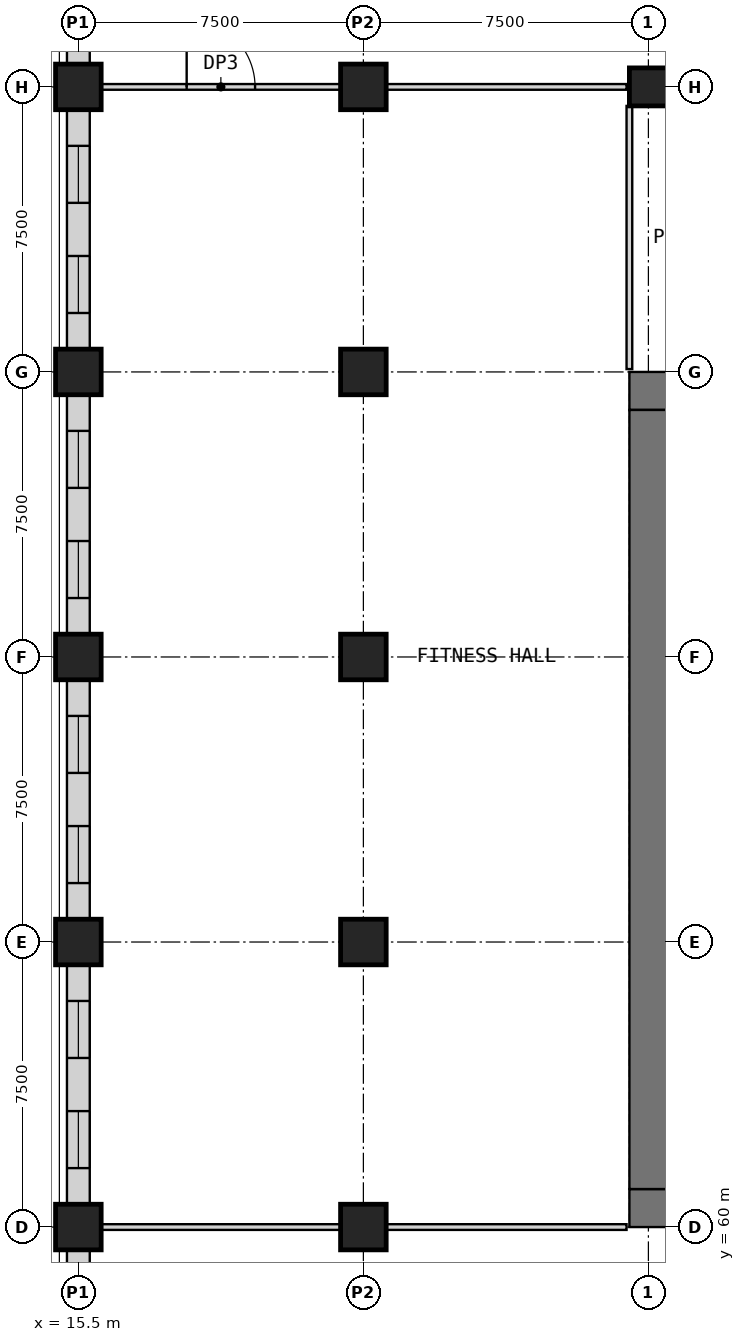
"""IFC4 building model, lengths in metres.
Left out: names, types, materials, properties, quantities, classifications, styles, units other than length and angle.
Written with IfcOpenShell. Run it as: python <this file> out.ifc"""

import sys

from ifc_helpers import new_model, si_unit, direction, frame, frame_2d, origin, origin_2d, place, context, subcontext, project, spatial, rectangle, extrude, element, fill, save


model = new_model("IFC4")
c1 = context("Model", 3, precision=1e-05, world=origin(), true_north=direction((0.0, 1.0)))
c2 = subcontext(c1, "Body", "Model", "MODEL_VIEW")
j1 = project(units=[si_unit("LENGTHUNIT", "METRE"), si_unit("PLANEANGLEUNIT", "RADIAN")], contexts=[c1])
p1 = place(None, origin())
s1 = spatial("IfcSite", under=j1, at=p1, CompositionType="ELEMENT")
p2 = place(p1, origin())
s2 = spatial("IfcBuilding", under=s1, at=p2, CompositionType="ELEMENT")
p3 = place(p2, frame((0.0, 0.0, 29.0)))
s3 = spatial("IfcBuildingStorey", under=s2, at=p3, CompositionType="ELEMENT", Elevation=29.0)
p4 = place(p3, frame((30.5, 90.0, 0.0), z_axis=(0.0, 0.0, 1.0), x_axis=(1.0, 0.0, 0.0)))
e1 = element("IfcColumn", 1, at=p4, inside=s3, PredefinedType="COLUMN", context=c2, shape_type="SweptSolid", body=[
    extrude(rectangle(XDim=1.0, YDim=1.0, at=origin_2d()), origin(), (0.0, 0.0, 1.0), 5.0),
])
for number, where, z_axis, x_axis in (
    (2, (15.5, 60.0, 0.0), (0.0, 0.0, 1.0), (1.0, 0.0, 0.0)),
    (3, (15.5, 67.5, 0.0), (0.0, 0.0, 1.0), (1.0, 0.0, 0.0)),
    (4, (15.5, 75.0, 0.0), (0.0, 0.0, 1.0), (1.0, 0.0, 0.0)),
    (5, (15.5, 82.5, 0.0), (0.0, 0.0, 1.0), (1.0, 0.0, 0.0)),
    (6, (15.5, 90.0, 0.0), (0.0, 0.0, 1.0), (1.0, 0.0, 0.0)),
    (7, (23.0, 60.0, 0.0), (0.0, 0.0, 1.0), (1.0, 0.0, 0.0)),
    (8, (23.0, 67.5, 0.0), (0.0, 0.0, 1.0), (1.0, 0.0, 0.0)),
    (9, (23.0, 75.0, 0.0), (0.0, 0.0, 1.0), (1.0, 0.0, 0.0)),
    (10, (23.0, 82.5, 0.0), (0.0, 0.0, 1.0), (1.0, 0.0, 0.0)),
    (11, (23.0, 90.0, 0.0), (0.0, 0.0, 1.0), (1.0, 0.0, 0.0)),
):
    element("IfcColumn", number, at=place(p3, frame(where, z_axis=z_axis, x_axis=x_axis)), inside=s3, PredefinedType="COLUMN", context=c2, shape_type="SweptSolid", body=[
        extrude(rectangle(XDim=1.2, YDim=1.2, at=origin_2d()), origin(), (0.0, 0.0, 1.0), 5.0),
    ])
p5 = place(p3, frame((30.0, 60.5, 0.0), z_axis=(0.0, 0.0, 1.0), x_axis=(1.0, 0.0, 0.0)))
e12 = element("IfcWall", 12, at=p5, inside=s3, PredefinedType="SHEAR", context=c2, shape_type="SweptSolid", body=[
    extrude(rectangle(XDim=30.0, YDim=1.0, at=frame_2d((15.0, 0.0))), origin(), (0.0, 0.0, 1.0), 5.0),
])
p6 = place(p5, frame((21.9, 0.0, 0.0)))
e13 = element("IfcOpeningElement", 13, at=p6, cuts=e12, PredefinedType="OPENING", context=c2, shape_type="SweptSolid", body=[
    extrude(rectangle(XDim=1.8, YDim=2.1, at=frame_2d((0.9, 1.05))), frame((0.0, 0.51, 0.0), z_axis=(0.0, -1.0, 0.0), x_axis=(1.0, 0.0, 0.0)), (0.0, 0.0, 1.0), 1.02),
])
p7 = place(p5, frame((26.5, 0.0, 0.0)))
e14 = element("IfcOpeningElement", 14, at=p7, cuts=e12, PredefinedType="OPENING", context=c2, shape_type="SweptSolid", body=[
    extrude(rectangle(XDim=1.2, YDim=2.1, at=frame_2d((0.6, 1.05))), frame((0.0, 0.51, 0.0), z_axis=(0.0, -1.0, 0.0), x_axis=(1.0, 0.0, 0.0)), (0.0, 0.0, 1.0), 1.02),
])
p8 = place(p3, frame((30.0, 82.0, 0.0), z_axis=(0.0, 0.0, 1.0), x_axis=(1.0, 0.0, 0.0)))
e15 = element("IfcWall", 15, at=p8, inside=s3, PredefinedType="SHEAR", context=c2, shape_type="SweptSolid", body=[
    extrude(rectangle(XDim=30.0, YDim=1.0, at=frame_2d((15.0, 0.0))), origin(), (0.0, 0.0, 1.0), 5.0),
])
p9 = place(p3, frame((30.5, 61.0, 0.0), z_axis=(0.0, 0.0, 1.0), x_axis=(0.0, 1.0, 0.0)))
e16 = element("IfcWall", 16, at=p9, inside=s3, PredefinedType="SHEAR", context=c2, shape_type="SweptSolid", body=[
    extrude(rectangle(XDim=20.5, YDim=1.0, at=frame_2d((10.25, 0.0))), origin(), (0.0, 0.0, 1.0), 5.0),
])
p10 = place(p3, frame((16.1, 60.0, 0.0), z_axis=(0.0, 0.0, 1.0), x_axis=(1.0, 0.0, 0.0)))
e17 = element("IfcWall", 17, at=p10, inside=s3, PredefinedType="PARTITIONING", context=c2, shape_type="SweptSolid", body=[
    extrude(rectangle(XDim=6.3, YDim=0.15, at=frame_2d((3.15, 0.0))), origin(), (0.0, 0.0, 1.0), 4.7),
])
p11 = place(p3, frame((23.6, 60.0, 0.0), z_axis=(0.0, 0.0, 1.0), x_axis=(1.0, 0.0, 0.0)))
e18 = element("IfcWall", 18, at=p11, inside=s3, PredefinedType="PARTITIONING", context=c2, shape_type="SweptSolid", body=[
    extrude(rectangle(XDim=6.325, YDim=0.15, at=frame_2d((3.163, 0.0))), origin(), (0.0, 0.0, 1.0), 4.7),
])
p12 = place(p3, frame((16.1, 90.0, 0.0), z_axis=(0.0, 0.0, 1.0), x_axis=(1.0, 0.0, 0.0)))
e19 = element("IfcWall", 19, at=p12, inside=s3, PredefinedType="PARTITIONING", context=c2, shape_type="SweptSolid", body=[
    extrude(rectangle(XDim=6.3, YDim=0.15, at=frame_2d((3.15, 0.0))), origin(), (0.0, 0.0, 1.0), 4.7),
])
p13 = place(p12, frame((2.25, 0.0, 0.0)))
e20 = element("IfcOpeningElement", 20, at=p13, cuts=e19, PredefinedType="OPENING", context=c2, shape_type="SweptSolid", body=[
    extrude(rectangle(XDim=1.8, YDim=2.4, at=frame_2d((0.9, 1.2))), frame((0.0, 0.085, 0.0), z_axis=(0.0, -1.0, 0.0), x_axis=(1.0, 0.0, 0.0)), (0.0, 0.0, 1.0), 0.17),
])
p14 = place(p3, frame((23.6, 90.0, 0.0), z_axis=(0.0, 0.0, 1.0), x_axis=(1.0, 0.0, 0.0)))
e21 = element("IfcWall", 21, at=p14, inside=s3, PredefinedType="PARTITIONING", context=c2, shape_type="SweptSolid", body=[
    extrude(rectangle(XDim=6.325, YDim=0.15, at=frame_2d((3.163, 0.0))), origin(), (0.0, 0.0, 1.0), 4.7),
])
p15 = place(p3, frame((15.5, 53.1, 0.0), z_axis=(0.0, 0.0, 1.0), x_axis=(0.0, 1.0, 0.0)))
e22 = element("IfcWall", 22, at=p15, inside=s3, PredefinedType="PARTITIONING", context=c2, shape_type="SweptSolid", body=[
    extrude(rectangle(XDim=6.3, YDim=0.6, at=frame_2d((3.15, 0.0))), origin(), (0.0, 0.0, 1.0), 4.7),
])
p16 = place(p15, frame((0.951, 0.0, 0.9)))
e23 = element("IfcOpeningElement", 23, at=p16, cuts=e22, PredefinedType="OPENING", context=c2, shape_type="SweptSolid", body=[
    extrude(rectangle(XDim=1.5, YDim=2.8, at=frame_2d((0.75, 1.4))), frame((0.0, 0.31, 0.0), z_axis=(0.0, -1.0, 0.0), x_axis=(1.0, 0.0, 0.0)), (0.0, 0.0, 1.0), 0.62),
])
p17 = place(p15, frame((3.849, 0.0, 0.9)))
e24 = element("IfcOpeningElement", 24, at=p17, cuts=e22, PredefinedType="OPENING", context=c2, shape_type="SweptSolid", body=[
    extrude(rectangle(XDim=1.5, YDim=2.8, at=frame_2d((0.75, 1.4))), frame((0.0, 0.31, 0.0), z_axis=(0.0, -1.0, 0.0), x_axis=(1.0, 0.0, 0.0)), (0.0, 0.0, 1.0), 0.62),
])
p18 = place(p3, frame((15.5, 60.6, 0.0), z_axis=(0.0, 0.0, 1.0), x_axis=(0.0, 1.0, 0.0)))
e25 = element("IfcWall", 25, at=p18, inside=s3, PredefinedType="PARTITIONING", context=c2, shape_type="SweptSolid", body=[
    extrude(rectangle(XDim=6.3, YDim=0.6, at=frame_2d((3.15, 0.0))), origin(), (0.0, 0.0, 1.0), 4.7),
])
p19 = place(p18, frame((0.951, 0.0, 0.9)))
e26 = element("IfcOpeningElement", 26, at=p19, cuts=e25, PredefinedType="OPENING", context=c2, shape_type="SweptSolid", body=[
    extrude(rectangle(XDim=1.5, YDim=2.8, at=frame_2d((0.75, 1.4))), frame((0.0, 0.31, 0.0), z_axis=(0.0, -1.0, 0.0), x_axis=(1.0, 0.0, 0.0)), (0.0, 0.0, 1.0), 0.62),
])
p20 = place(p18, frame((3.849, 0.0, 0.9)))
e27 = element("IfcOpeningElement", 27, at=p20, cuts=e25, PredefinedType="OPENING", context=c2, shape_type="SweptSolid", body=[
    extrude(rectangle(XDim=1.5, YDim=2.8, at=frame_2d((0.75, 1.4))), frame((0.0, 0.31, 0.0), z_axis=(0.0, -1.0, 0.0), x_axis=(1.0, 0.0, 0.0)), (0.0, 0.0, 1.0), 0.62),
])
p21 = place(p3, frame((15.5, 68.1, 0.0), z_axis=(0.0, 0.0, 1.0), x_axis=(0.0, 1.0, 0.0)))
e28 = element("IfcWall", 28, at=p21, inside=s3, PredefinedType="PARTITIONING", context=c2, shape_type="SweptSolid", body=[
    extrude(rectangle(XDim=6.3, YDim=0.6, at=frame_2d((3.15, 0.0))), origin(), (0.0, 0.0, 1.0), 4.7),
])
p22 = place(p21, frame((0.951, 0.0, 0.9)))
e29 = element("IfcOpeningElement", 29, at=p22, cuts=e28, PredefinedType="OPENING", context=c2, shape_type="SweptSolid", body=[
    extrude(rectangle(XDim=1.5, YDim=2.8, at=frame_2d((0.75, 1.4))), frame((0.0, 0.31, 0.0), z_axis=(0.0, -1.0, 0.0), x_axis=(1.0, 0.0, 0.0)), (0.0, 0.0, 1.0), 0.62),
])
p23 = place(p21, frame((3.849, 0.0, 0.9)))
e30 = element("IfcOpeningElement", 30, at=p23, cuts=e28, PredefinedType="OPENING", context=c2, shape_type="SweptSolid", body=[
    extrude(rectangle(XDim=1.5, YDim=2.8, at=frame_2d((0.75, 1.4))), frame((0.0, 0.31, 0.0), z_axis=(0.0, -1.0, 0.0), x_axis=(1.0, 0.0, 0.0)), (0.0, 0.0, 1.0), 0.62),
])
p24 = place(p3, frame((15.5, 75.6, 0.0), z_axis=(0.0, 0.0, 1.0), x_axis=(0.0, 1.0, 0.0)))
e31 = element("IfcWall", 31, at=p24, inside=s3, PredefinedType="PARTITIONING", context=c2, shape_type="SweptSolid", body=[
    extrude(rectangle(XDim=6.3, YDim=0.6, at=frame_2d((3.15, 0.0))), origin(), (0.0, 0.0, 1.0), 4.7),
])
p25 = place(p24, frame((0.951, 0.0, 0.9)))
e32 = element("IfcOpeningElement", 32, at=p25, cuts=e31, PredefinedType="OPENING", context=c2, shape_type="SweptSolid", body=[
    extrude(rectangle(XDim=1.5, YDim=2.8, at=frame_2d((0.75, 1.4))), frame((0.0, 0.31, 0.0), z_axis=(0.0, -1.0, 0.0), x_axis=(1.0, 0.0, 0.0)), (0.0, 0.0, 1.0), 0.62),
])
p26 = place(p24, frame((3.849, 0.0, 0.9)))
e33 = element("IfcOpeningElement", 33, at=p26, cuts=e31, PredefinedType="OPENING", context=c2, shape_type="SweptSolid", body=[
    extrude(rectangle(XDim=1.5, YDim=2.8, at=frame_2d((0.75, 1.4))), frame((0.0, 0.31, 0.0), z_axis=(0.0, -1.0, 0.0), x_axis=(1.0, 0.0, 0.0)), (0.0, 0.0, 1.0), 0.62),
])
p27 = place(p3, frame((15.5, 83.1, 0.0), z_axis=(0.0, 0.0, 1.0), x_axis=(0.0, 1.0, 0.0)))
e34 = element("IfcWall", 34, at=p27, inside=s3, PredefinedType="PARTITIONING", context=c2, shape_type="SweptSolid", body=[
    extrude(rectangle(XDim=6.3, YDim=0.6, at=frame_2d((3.15, 0.0))), origin(), (0.0, 0.0, 1.0), 4.7),
])
p28 = place(p27, frame((0.951, 0.0, 0.9)))
e35 = element("IfcOpeningElement", 35, at=p28, cuts=e34, PredefinedType="OPENING", context=c2, shape_type="SweptSolid", body=[
    extrude(rectangle(XDim=1.5, YDim=2.8, at=frame_2d((0.75, 1.4))), frame((0.0, 0.31, 0.0), z_axis=(0.0, -1.0, 0.0), x_axis=(1.0, 0.0, 0.0)), (0.0, 0.0, 1.0), 0.62),
])
p29 = place(p27, frame((3.849, 0.0, 0.9)))
e36 = element("IfcOpeningElement", 36, at=p29, cuts=e34, PredefinedType="OPENING", context=c2, shape_type="SweptSolid", body=[
    extrude(rectangle(XDim=1.5, YDim=2.8, at=frame_2d((0.75, 1.4))), frame((0.0, 0.31, 0.0), z_axis=(0.0, -1.0, 0.0), x_axis=(1.0, 0.0, 0.0)), (0.0, 0.0, 1.0), 0.62),
])
p30 = place(p3, frame((15.5, 90.6, 0.0), z_axis=(0.0, 0.0, 1.0), x_axis=(0.0, 1.0, 0.0)))
e37 = element("IfcWall", 37, at=p30, inside=s3, PredefinedType="PARTITIONING", context=c2, shape_type="SweptSolid", body=[
    extrude(rectangle(XDim=5.8, YDim=0.6, at=frame_2d((2.9, 0.0))), origin(), (0.0, 0.0, 1.0), 4.7),
])
p31 = place(p30, frame((0.816, 0.0, 0.9)))
e38 = element("IfcOpeningElement", 38, at=p31, cuts=e37, PredefinedType="OPENING", context=c2, shape_type="SweptSolid", body=[
    extrude(rectangle(XDim=1.5, YDim=2.8, at=frame_2d((0.75, 1.4))), frame((0.0, 0.31, 0.0), z_axis=(0.0, -1.0, 0.0), x_axis=(1.0, 0.0, 0.0)), (0.0, 0.0, 1.0), 0.62),
])
p32 = place(p30, frame((3.484, 0.0, 0.9)))
e39 = element("IfcOpeningElement", 39, at=p32, cuts=e37, PredefinedType="OPENING", context=c2, shape_type="SweptSolid", body=[
    extrude(rectangle(XDim=1.5, YDim=2.8, at=frame_2d((0.75, 1.4))), frame((0.0, 0.31, 0.0), z_axis=(0.0, -1.0, 0.0), x_axis=(1.0, 0.0, 0.0)), (0.0, 0.0, 1.0), 0.62),
])
p33 = place(p3, frame((30.0, 82.575, 0.0), z_axis=(0.0, 0.0, 1.0), x_axis=(0.0, 1.0, 0.0)))
e40 = element("IfcWall", 40, at=p33, inside=s3, PredefinedType="PARTITIONING", context=c2, shape_type="SweptSolid", body=[
    extrude(rectangle(XDim=6.925, YDim=0.15, at=frame_2d((3.462, 0.0))), origin(), (0.0, 0.0, 1.0), 4.7),
])
p34 = place(p13, origin())
e41 = element("IfcDoor", 41, at=p34, inside=s3, OperationType="SINGLE_SWING_LEFT", PredefinedType="DOOR", context=c2, shape_type="SweptSolid", body=[
    extrude(rectangle(XDim=1.8, YDim=2.4, at=frame_2d((0.9, 1.2))), frame((0.0, 0.025, 0.0), z_axis=(0.0, -1.0, 0.0), x_axis=(1.0, 0.0, 0.0)), (0.0, 0.0, 1.0), 0.05),
])
fill(e20, e41)
p35 = place(p19, origin())
e42 = element("IfcWindow", 42, at=p35, inside=s3, PartitioningType="SINGLE_PANEL", PredefinedType="WINDOW", context=c2, shape_type="SweptSolid", body=[
    extrude(rectangle(XDim=1.5, YDim=2.8, at=frame_2d((0.75, 1.4))), frame((0.0, 0.03, 0.0), z_axis=(0.0, -1.0, 0.0), x_axis=(1.0, 0.0, 0.0)), (0.0, 0.0, 1.0), 0.06),
])
fill(e26, e42)
p36 = place(p20, origin())
e43 = element("IfcWindow", 43, at=p36, inside=s3, PartitioningType="SINGLE_PANEL", PredefinedType="WINDOW", context=c2, shape_type="SweptSolid", body=[
    extrude(rectangle(XDim=1.5, YDim=2.8, at=frame_2d((0.75, 1.4))), frame((0.0, 0.03, 0.0), z_axis=(0.0, -1.0, 0.0), x_axis=(1.0, 0.0, 0.0)), (0.0, 0.0, 1.0), 0.06),
])
fill(e27, e43)
p37 = place(p22, origin())
e44 = element("IfcWindow", 44, at=p37, inside=s3, PartitioningType="SINGLE_PANEL", PredefinedType="WINDOW", context=c2, shape_type="SweptSolid", body=[
    extrude(rectangle(XDim=1.5, YDim=2.8, at=frame_2d((0.75, 1.4))), frame((0.0, 0.03, 0.0), z_axis=(0.0, -1.0, 0.0), x_axis=(1.0, 0.0, 0.0)), (0.0, 0.0, 1.0), 0.06),
])
fill(e29, e44)
p38 = place(p23, origin())
e45 = element("IfcWindow", 45, at=p38, inside=s3, PartitioningType="SINGLE_PANEL", PredefinedType="WINDOW", context=c2, shape_type="SweptSolid", body=[
    extrude(rectangle(XDim=1.5, YDim=2.8, at=frame_2d((0.75, 1.4))), frame((0.0, 0.03, 0.0), z_axis=(0.0, -1.0, 0.0), x_axis=(1.0, 0.0, 0.0)), (0.0, 0.0, 1.0), 0.06),
])
fill(e30, e45)
p39 = place(p25, origin())
e46 = element("IfcWindow", 46, at=p39, inside=s3, PartitioningType="SINGLE_PANEL", PredefinedType="WINDOW", context=c2, shape_type="SweptSolid", body=[
    extrude(rectangle(XDim=1.5, YDim=2.8, at=frame_2d((0.75, 1.4))), frame((0.0, 0.03, 0.0), z_axis=(0.0, -1.0, 0.0), x_axis=(1.0, 0.0, 0.0)), (0.0, 0.0, 1.0), 0.06),
])
fill(e32, e46)
p40 = place(p26, origin())
e47 = element("IfcWindow", 47, at=p40, inside=s3, PartitioningType="SINGLE_PANEL", PredefinedType="WINDOW", context=c2, shape_type="SweptSolid", body=[
    extrude(rectangle(XDim=1.5, YDim=2.8, at=frame_2d((0.75, 1.4))), frame((0.0, 0.03, 0.0), z_axis=(0.0, -1.0, 0.0), x_axis=(1.0, 0.0, 0.0)), (0.0, 0.0, 1.0), 0.06),
])
fill(e33, e47)
p41 = place(p28, origin())
e48 = element("IfcWindow", 48, at=p41, inside=s3, PartitioningType="SINGLE_PANEL", PredefinedType="WINDOW", context=c2, shape_type="SweptSolid", body=[
    extrude(rectangle(XDim=1.5, YDim=2.8, at=frame_2d((0.75, 1.4))), frame((0.0, 0.03, 0.0), z_axis=(0.0, -1.0, 0.0), x_axis=(1.0, 0.0, 0.0)), (0.0, 0.0, 1.0), 0.06),
])
fill(e35, e48)
p42 = place(p29, origin())
e49 = element("IfcWindow", 49, at=p42, inside=s3, PartitioningType="SINGLE_PANEL", PredefinedType="WINDOW", context=c2, shape_type="SweptSolid", body=[
    extrude(rectangle(XDim=1.5, YDim=2.8, at=frame_2d((0.75, 1.4))), frame((0.0, 0.03, 0.0), z_axis=(0.0, -1.0, 0.0), x_axis=(1.0, 0.0, 0.0)), (0.0, 0.0, 1.0), 0.06),
])
fill(e36, e49)
save(model, sys.argv[1])
